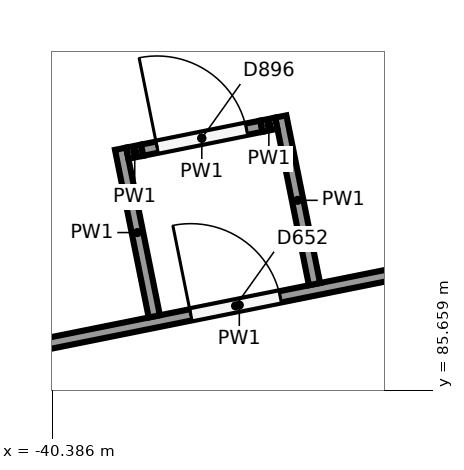
"""IFC4 building model, lengths in metres.
Left out: names, types, materials, properties, quantities, classifications, styles, units other than length and angle.
Written with IfcOpenShell. Run it as: python <this file> out.ifc"""

import sys

from ifc_helpers import new_model, si_unit, direction, frame, frame_2d, origin, place, context, subcontext, project, spatial, rectangle, extrude, element, fill, save


model = new_model("IFC4")
c1 = context("Model", 3, precision=1e-05, world=origin(), true_north=direction((0.0, 1.0)))
c2 = subcontext(c1, "Body", "Model", "MODEL_VIEW")
j1 = project(units=[si_unit("LENGTHUNIT", "METRE"), si_unit("PLANEANGLEUNIT", "RADIAN")], contexts=[c1])
p1 = place(None, origin())
s1 = spatial("IfcSite", under=j1, at=p1, CompositionType="ELEMENT")
p2 = place(p1, origin())
s2 = spatial("IfcBuilding", under=s1, at=p2, CompositionType="ELEMENT")
p3 = place(p2, frame((0.0, 0.0, 6.5)))
s3 = spatial("IfcBuildingStorey", under=s2, at=p3, CompositionType="ELEMENT", Elevation=6.5)
p4 = place(p3, frame((-42.189, 85.923, 0.0), z_axis=(0.0, 0.0, 1.0), x_axis=(0.980362096197, 0.197205883129, 0.0)))
e1 = element("IfcWall", 1, at=p4, inside=s3, PredefinedType="PARTITIONING", context=c2, shape_type="SweptSolid", body=[
    extrude(rectangle(XDim=8.702, YDim=0.15, at=frame_2d((4.351, 0.0))), origin(), (0.0, 0.0, 1.0), 5.15),
])
p5 = place(p4, frame((3.7, 0.0, 0.0)))
e2 = element("IfcOpeningElement", 2, at=p5, cuts=e1, PredefinedType="OPENING", context=c2, shape_type="SweptSolid", body=[
    extrude(rectangle(XDim=1.2, YDim=2.1, at=frame_2d((0.6, 1.05))), frame((0.0, 0.085, 0.0), z_axis=(0.0, -1.0, 0.0), x_axis=(1.0, 0.0, 0.0)), (0.0, 0.0, 1.0), 0.17),
])
for number, where, z_axis, x_axis in (
    (3, (-39.042, 86.633, 0.0), (0.0, 0.0, 1.0), (-0.197, 0.98, 0.0)),
    (4, (-36.934, 87.056, 0.0), (0.0, 0.0, 1.0), (-0.197, 0.98, 0.0)),
):
    element("IfcWall", number, at=place(p3, frame(where, z_axis=z_axis, x_axis=x_axis)), inside=s3, PredefinedType="PARTITIONING", context=c2, shape_type="SweptSolid", body=[
        extrude(rectangle(XDim=2.25, YDim=0.15, at=frame_2d((1.125, 0.0))), origin(), (0.0, 0.0, 1.0), 5.15),
    ])
p6 = place(p3, frame((-39.398, 88.78, 0.0), z_axis=(0.0, 0.0, 1.0), x_axis=(0.980250639168, 0.197759157591, 0.0)))
e5 = element("IfcWall", 5, at=p6, inside=s3, PredefinedType="PARTITIONING", context=c2, shape_type="SweptSolid", body=[
    extrude(rectangle(XDim=0.2, YDim=0.15, at=frame_2d((0.1, 0.0))), origin(), (0.0, 0.0, 1.0), 5.15),
])
p7 = place(p3, frame((-39.202, 88.819, 0.0), z_axis=(0.0, 0.0, 1.0), x_axis=(0.98037473159, 0.197143058866, 0.0)))
e6 = element("IfcWall", 6, at=p7, inside=s3, PredefinedType="PARTITIONING", context=c2, shape_type="SweptSolid", body=[
    extrude(rectangle(XDim=1.6, YDim=0.15, at=frame_2d((0.8, 0.0))), origin(), (0.0, 0.0, 1.0), 5.15),
])
p8 = place(p7, frame((0.2, 0.0, 0.0)))
e7 = element("IfcOpeningElement", 7, at=p8, cuts=e6, PredefinedType="OPENING", context=c2, shape_type="SweptSolid", body=[
    extrude(rectangle(XDim=1.2, YDim=2.1, at=frame_2d((0.6, 1.05))), frame((0.0, 0.085, 0.0), z_axis=(0.0, -1.0, 0.0), x_axis=(1.0, 0.0, 0.0)), (0.0, 0.0, 1.0), 0.17),
])
p9 = place(p3, frame((-37.633, 89.135, 0.0), z_axis=(0.0, 0.0, 1.0), x_axis=(0.980250639168, 0.197759157591, 0.0)))
e8 = element("IfcWall", 8, at=p9, inside=s3, PredefinedType="PARTITIONING", context=c2, shape_type="SweptSolid", body=[
    extrude(rectangle(XDim=0.2, YDim=0.15, at=frame_2d((0.1, 0.0))), origin(), (0.0, 0.0, 1.0), 5.15),
])
p10 = place(p5, origin())
e9 = element("IfcDoor", 9, at=p10, inside=s3, OperationType="SINGLE_SWING_LEFT", PredefinedType="DOOR", context=c2, shape_type="SweptSolid", body=[
    extrude(rectangle(XDim=1.2, YDim=2.1, at=frame_2d((0.6, 1.05))), frame((0.0, 0.025, 0.0), z_axis=(0.0, -1.0, 0.0), x_axis=(1.0, 0.0, 0.0)), (0.0, 0.0, 1.0), 0.05),
])
fill(e2, e9)
p11 = place(p8, origin())
e10 = element("IfcDoor", 10, at=p11, inside=s3, OperationType="SINGLE_SWING_LEFT", PredefinedType="DOOR", context=c2, shape_type="SweptSolid", body=[
    extrude(rectangle(XDim=1.2, YDim=2.1, at=frame_2d((0.6, 1.05))), frame((0.0, 0.025, 0.0), z_axis=(0.0, -1.0, 0.0), x_axis=(1.0, 0.0, 0.0)), (0.0, 0.0, 1.0), 0.05),
])
fill(e7, e10)
save(model, sys.argv[1])
